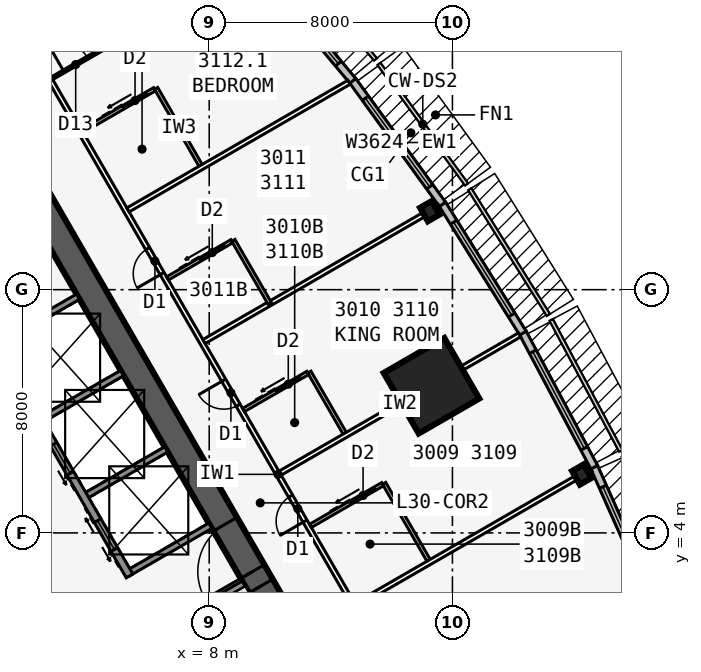
"""IFC4 building model, lengths in metres.
Left out: names, types, materials, properties, quantities, classifications, styles, units other than length and angle.
Written with IfcOpenShell. Run it as: python <this file> out.ifc"""

import sys

from ifc_helpers import new_model, si_unit, direction, frame, frame_2d, origin, origin_2d, place, context, subcontext, project, spatial, rectangle, i_section, extrude, element, fill, save


model = new_model("IFC4")
c1 = context("Model", 3, precision=1e-05, world=origin(), true_north=direction((0.0, 1.0)))
c2 = subcontext(c1, "Body", "Model", "MODEL_VIEW")
j1 = project(units=[si_unit("LENGTHUNIT", "METRE"), si_unit("PLANEANGLEUNIT", "RADIAN")], contexts=[c1])
p1 = place(None, origin())
s1 = spatial("IfcSite", under=j1, at=p1, CompositionType="ELEMENT")
p2 = place(p1, origin())
s2 = spatial("IfcBuilding", under=s1, at=p2, CompositionType="ELEMENT")
p3 = place(p2, frame((0.0, 0.0, 118.1)))
s3 = spatial("IfcBuildingStorey", under=s2, at=p3, CompositionType="ELEMENT", Elevation=118.1)
p4 = place(p3, frame((16.5, -9.526, 0.0), z_axis=(0.0, 0.0, 1.0), x_axis=(-0.499999749417, 0.866025548458, 0.0)))
e1 = element("IfcWall", 1, at=p4, inside=s3, PredefinedType="SHEAR", context=c2, shape_type="SweptSolid", body=[
    extrude(rectangle(XDim=33.0, YDim=0.9, at=frame_2d((16.5, 0.0))), origin(), (0.0, 0.0, 1.0), 3.4),
])
p5 = place(p4, frame((14.15, 0.0, 0.0)))
e2 = element("IfcOpeningElement", 2, at=p5, cuts=e1, PredefinedType="OPENING", context=c2, shape_type="SweptSolid", body=[
    extrude(rectangle(XDim=1.8, YDim=2.13, at=frame_2d((0.9, 1.065))), frame((0.0, 0.46, 0.0), z_axis=(0.0, -1.0, 0.0), x_axis=(1.0, 0.0, 0.0)), (0.0, 0.0, 1.0), 0.92),
])
p6 = place(p4, frame((12.6, 0.0, 0.0)))
e3 = element("IfcOpeningElement", 3, at=p6, cuts=e1, PredefinedType="OPENING", context=c2, shape_type="SweptSolid", body=[
    extrude(rectangle(XDim=1.0, YDim=2.13, at=frame_2d((0.5, 1.065))), frame((0.0, 0.46, 0.0), z_axis=(0.0, -1.0, 0.0), x_axis=(1.0, 0.0, 0.0)), (0.0, 0.0, 1.0), 0.92),
])
p7 = place(p3, frame((5.379, 2.586, 0.0), z_axis=(0.0, 0.0, 1.0), x_axis=(-0.500001375892, 0.866024609411, 0.0)))
e4 = element("IfcWall", 4, at=p7, inside=s3, PredefinedType="SOLIDWALL", context=c2, shape_type="SweptSolid", body=[
    extrude(rectangle(XDim=10.633, YDim=0.25, at=frame_2d((5.316, 0.0))), origin(), (0.0, 0.0, 1.0), 3.235),
])
p8 = place(p7, frame((9.164, 0.0, 0.0)))
e5 = element("IfcOpeningElement", 5, at=p8, cuts=e4, PredefinedType="OPENING", context=c2, shape_type="SweptSolid", body=[
    extrude(rectangle(XDim=0.9, YDim=2.13, at=frame_2d((0.45, 1.065))), frame((0.0, 0.135, 0.0), z_axis=(0.0, -1.0, 0.0), x_axis=(1.0, 0.0, 0.0)), (0.0, 0.0, 1.0), 0.27),
])
p9 = place(p7, frame((1.0, 0.0, 0.0)))
e6 = element("IfcOpeningElement", 6, at=p9, cuts=e4, PredefinedType="OPENING", context=c2, shape_type="SweptSolid", body=[
    extrude(rectangle(XDim=1.1, YDim=2.13, at=frame_2d((0.55, 1.065))), frame((0.0, 0.135, 0.0), z_axis=(0.0, -1.0, 0.0), x_axis=(1.0, 0.0, 0.0)), (0.0, 0.0, 1.0), 0.27),
])
p10 = place(p7, frame((3.9, 0.0, 0.0)))
e7 = element("IfcOpeningElement", 7, at=p10, cuts=e4, PredefinedType="OPENING", context=c2, shape_type="SweptSolid", body=[
    extrude(rectangle(XDim=1.1, YDim=2.13, at=frame_2d((0.55, 1.065))), frame((0.0, 0.135, 0.0), z_axis=(0.0, -1.0, 0.0), x_axis=(1.0, 0.0, 0.0)), (0.0, 0.0, 1.0), 0.27),
])
p11 = place(p7, frame((6.8, 0.0, 0.0)))
e8 = element("IfcOpeningElement", 8, at=p11, cuts=e4, PredefinedType="OPENING", context=c2, shape_type="SweptSolid", body=[
    extrude(rectangle(XDim=1.1, YDim=2.13, at=frame_2d((0.55, 1.065))), frame((0.0, 0.135, 0.0), z_axis=(0.0, -1.0, 0.0), x_axis=(1.0, 0.0, 0.0)), (0.0, 0.0, 1.0), 0.27),
])
for number, where, z_axis, x_axis in (
    (9, (6.429, 0.767, 0.0), (0.0, 0.0, 1.0), (0.866, 0.5, 0.0)),
    (10, (5.329, 2.673, 0.0), (0.0, 0.0, 1.0), (0.866, 0.5, 0.0)),
    (11, (3.879, 5.184, 0.0), (0.0, 0.0, 1.0), (0.866, 0.5, 0.0)),
    (12, (2.429, 7.696, 0.0), (0.0, 0.0, 1.0), (0.866, 0.5, 0.0)),
    (13, (0.979, 10.207, 0.0), (0.0, 0.0, 1.0), (0.866, 0.5, 0.0)),
):
    element("IfcWall", number, at=place(p3, frame(where, z_axis=z_axis, x_axis=x_axis)), inside=s3, PredefinedType="SOLIDWALL", context=c2, shape_type="SweptSolid", body=[
        extrude(rectangle(XDim=3.125, YDim=0.2, at=frame_2d((1.562, 0.0))), origin(), (0.0, 0.0, 1.0), 3.235),
    ])
for number, where, z_axis, x_axis in (
    (14, (20.254, 5.92, 0.0), (0.0, 0.0, 1.0), (0.866, 0.5, 0.0)),
    (15, (15.254, 14.58, 0.0), (0.0, 0.0, 1.0), (0.866, 0.5, 0.0)),
):
    element("IfcColumn", number, at=place(p3, frame(where, z_axis=z_axis, x_axis=x_axis)), inside=s3, PredefinedType="COLUMN", context=c2, shape_type="SweptSolid", body=[
        extrude(i_section(OverallWidth=0.437, OverallDepth=0.513, WebThickness=0.061, FlangeThickness=0.097, at=origin_2d()), origin(), (0.0, 0.0, 1.0), 3.4),
    ])
p12 = place(p3, frame((15.312, 8.84, 0.0), z_axis=(0.0, 0.0, 1.0), x_axis=(0.866025403784, 0.5, 0.0)))
e16 = element("IfcColumn", 16, at=p12, inside=s3, PredefinedType="COLUMN", context=c2, shape_type="SweptSolid", body=[
    extrude(rectangle(XDim=2.3, YDim=2.3, at=origin_2d()), origin(), (0.0, 0.0, 1.0), 3.4),
])
p13 = place(p3, frame((22.705, 1.576, 0.0), z_axis=(0.0, 0.0, 1.0), x_axis=(-0.406832200364, 0.913502906808, 0.0)))
e17 = element("IfcWall", 17, at=p13, inside=s3, PredefinedType="STANDARD", context=c2, shape_type="SweptSolid", body=[
    extrude(rectangle(XDim=5.028, YDim=0.25, at=frame_2d((2.514, 0.0))), origin(), (0.0, 0.0, 1.0), 3.235),
])
p14 = place(p13, frame((0.714, 0.0, 0.45)))
e18 = element("IfcOpeningElement", 18, at=p14, cuts=e17, PredefinedType="OPENING", context=c2, shape_type="SweptSolid", body=[
    extrude(rectangle(XDim=3.6, YDim=2.4, at=frame_2d((1.8, 1.2))), frame((0.0, 0.135, 0.0), z_axis=(0.0, -1.0, 0.0), x_axis=(1.0, 0.0, 0.0)), (0.0, 0.0, 1.0), 0.27),
])
p15 = place(p3, frame((20.663, 6.161, 0.0), z_axis=(0.0, 0.0, 1.0), x_axis=(-0.469404966864, 0.882982999317, 0.0)))
e19 = element("IfcWall", 19, at=p15, inside=s3, PredefinedType="STANDARD", context=c2, shape_type="SweptSolid", body=[
    extrude(rectangle(XDim=5.003, YDim=0.25, at=frame_2d((2.501, 0.0))), origin(), (0.0, 0.0, 1.0), 3.235),
])
p16 = place(p15, frame((0.701, 0.0, 0.45)))
e20 = element("IfcOpeningElement", 20, at=p16, cuts=e19, PredefinedType="OPENING", context=c2, shape_type="SweptSolid", body=[
    extrude(rectangle(XDim=3.6, YDim=2.4, at=frame_2d((1.8, 1.2))), frame((0.0, 0.135, 0.0), z_axis=(0.0, -1.0, 0.0), x_axis=(1.0, 0.0, 0.0)), (0.0, 0.0, 1.0), 0.27),
])
p17 = place(p3, frame((18.319, 10.571, 0.0), z_axis=(0.0, 0.0, 1.0), x_axis=(-0.529990167382, 0.84800378683, 0.0)))
e21 = element("IfcWall", 21, at=p17, inside=s3, PredefinedType="STANDARD", context=c2, shape_type="SweptSolid", body=[
    extrude(rectangle(XDim=5.003, YDim=0.25, at=frame_2d((2.501, 0.0))), origin(), (0.0, 0.0, 1.0), 3.235),
])
p18 = place(p17, frame((0.701, 0.0, 0.45)))
e22 = element("IfcOpeningElement", 22, at=p18, cuts=e21, PredefinedType="OPENING", context=c2, shape_type="SweptSolid", body=[
    extrude(rectangle(XDim=3.6, YDim=2.4, at=frame_2d((1.8, 1.2))), frame((0.0, 0.135, 0.0), z_axis=(0.0, -1.0, 0.0), x_axis=(1.0, 0.0, 0.0)), (0.0, 0.0, 1.0), 0.27),
])
p19 = place(p3, frame((15.672, 14.807, 0.0), z_axis=(0.0, 0.0, 1.0), x_axis=(-0.587669188412, 0.809101307001, 0.0)))
e23 = element("IfcWall", 23, at=p19, inside=s3, PredefinedType="STANDARD", context=c2, shape_type="SweptSolid", body=[
    extrude(rectangle(XDim=5.028, YDim=0.25, at=frame_2d((2.514, 0.0))), origin(), (0.0, 0.0, 1.0), 3.235),
])
p20 = place(p19, frame((0.714, 0.0, 0.45)))
e24 = element("IfcOpeningElement", 24, at=p20, cuts=e23, PredefinedType="OPENING", context=c2, shape_type="SweptSolid", body=[
    extrude(rectangle(XDim=3.6, YDim=2.4, at=frame_2d((1.8, 1.2))), frame((0.0, 0.135, 0.0), z_axis=(0.0, -1.0, 0.0), x_axis=(1.0, 0.0, 0.0)), (0.0, 0.0, 1.0), 0.27),
])
p21 = place(p3, frame((12.723, 18.868, 0.0), z_axis=(0.0, 0.0, 1.0), x_axis=(-0.641810386606, 0.766863369607, 0.0)))
e25 = element("IfcWall", 25, at=p21, inside=s3, PredefinedType="STANDARD", context=c2, shape_type="SweptSolid", body=[
    extrude(rectangle(XDim=5.076, YDim=0.25, at=frame_2d((2.538, 0.0))), origin(), (0.0, 0.0, 1.0), 3.235),
])
p22 = place(p21, frame((0.738, 0.0, 0.45)))
e26 = element("IfcOpeningElement", 26, at=p22, cuts=e25, PredefinedType="OPENING", context=c2, shape_type="SweptSolid", body=[
    extrude(rectangle(XDim=3.6, YDim=2.4, at=frame_2d((1.8, 1.2))), frame((0.0, 0.135, 0.0), z_axis=(0.0, -1.0, 0.0), x_axis=(1.0, 0.0, 0.0)), (0.0, 0.0, 1.0), 0.27),
])
p23 = place(p3, frame((20.027, -10.985, 0.0), z_axis=(0.0, 0.0, 1.0), x_axis=(-0.500001677587, 0.866024435227, 0.0)))
e27 = element("IfcWall", 27, at=p23, inside=s3, PredefinedType="PARTITIONING", context=c2, shape_type="SweptSolid", body=[
    extrude(rectangle(XDim=39.054, YDim=0.15, at=frame_2d((19.527, 0.0))), origin(), (0.0, 0.0, 1.0), 3.235),
])
p24 = place(p23, frame((0.352, 0.0, 0.0)))
e28 = element("IfcOpeningElement", 28, at=p24, cuts=e27, PredefinedType="OPENING", context=c2, shape_type="SweptSolid", body=[
    extrude(rectangle(XDim=0.95, YDim=2.13, at=frame_2d((0.475, 1.065))), frame((0.0, 0.085, 0.0), z_axis=(0.0, -1.0, 0.0), x_axis=(1.0, 0.0, 0.0)), (0.0, 0.0, 1.0), 0.17),
])
p25 = place(p23, frame((7.752, 0.0, 0.0)))
e29 = element("IfcOpeningElement", 29, at=p25, cuts=e27, PredefinedType="OPENING", context=c2, shape_type="SweptSolid", body=[
    extrude(rectangle(XDim=0.95, YDim=2.13, at=frame_2d((0.475, 1.065))), frame((0.0, 0.085, 0.0), z_axis=(0.0, -1.0, 0.0), x_axis=(1.0, 0.0, 0.0)), (0.0, 0.0, 1.0), 0.17),
])
p26 = place(p23, frame((17.752, 0.0, 0.0)))
e30 = element("IfcOpeningElement", 30, at=p26, cuts=e27, PredefinedType="OPENING", context=c2, shape_type="SweptSolid", body=[
    extrude(rectangle(XDim=0.95, YDim=2.13, at=frame_2d((0.475, 1.065))), frame((0.0, 0.085, 0.0), z_axis=(0.0, -1.0, 0.0), x_axis=(1.0, 0.0, 0.0)), (0.0, 0.0, 1.0), 0.17),
])
p27 = place(p23, frame((22.152, 0.0, 0.0)))
e31 = element("IfcOpeningElement", 31, at=p27, cuts=e27, PredefinedType="OPENING", context=c2, shape_type="SweptSolid", body=[
    extrude(rectangle(XDim=0.95, YDim=2.13, at=frame_2d((0.475, 1.065))), frame((0.0, 0.085, 0.0), z_axis=(0.0, -1.0, 0.0), x_axis=(1.0, 0.0, 0.0)), (0.0, 0.0, 1.0), 0.17),
])
p28 = place(p23, frame((27.152, 0.0, 0.0)))
e32 = element("IfcOpeningElement", 32, at=p28, cuts=e27, PredefinedType="OPENING", context=c2, shape_type="SweptSolid", body=[
    extrude(rectangle(XDim=0.95, YDim=2.13, at=frame_2d((0.475, 1.065))), frame((0.0, 0.085, 0.0), z_axis=(0.0, -1.0, 0.0), x_axis=(1.0, 0.0, 0.0)), (0.0, 0.0, 1.0), 0.17),
])
p29 = place(p23, frame((36.546, 0.0, 0.0)))
e33 = element("IfcOpeningElement", 33, at=p29, cuts=e27, PredefinedType="OPENING", context=c2, shape_type="SweptSolid", body=[
    extrude(rectangle(XDim=0.95, YDim=2.13, at=frame_2d((0.475, 1.065))), frame((0.0, 0.085, 0.0), z_axis=(0.0, -1.0, 0.0), x_axis=(1.0, 0.0, 0.0)), (0.0, 0.0, 1.0), 0.17),
])
p30 = place(p3, frame((12.829, 1.633, 0.0), z_axis=(0.0, 0.0, 1.0), x_axis=(0.866027015393, 0.499997208602, 0.0)))
e34 = element("IfcWall", 34, at=p30, inside=s3, PredefinedType="PARTITIONING", context=c2, shape_type="SweptSolid", body=[
    extrude(rectangle(XDim=8.922, YDim=0.15, at=frame_2d((4.461, 0.0))), origin(), (0.0, 0.0, 1.0), 2.389),
])
p31 = place(p3, frame((10.329, 5.963, 0.0), z_axis=(0.0, 0.0, 1.0), x_axis=(0.866025170687, 0.500000403736, 0.0)))
e35 = element("IfcWall", 35, at=p31, inside=s3, PredefinedType="PARTITIONING", context=c2, shape_type="SweptSolid", body=[
    extrude(rectangle(XDim=9.099, YDim=0.15, at=frame_2d((4.549, 0.0))), origin(), (0.0, 0.0, 1.0), 2.389),
])
p32 = place(p3, frame((7.829, 10.293, 0.0), z_axis=(0.0, 0.0, 1.0), x_axis=(0.866027015393, 0.499997208602, 0.0)))
e36 = element("IfcWall", 36, at=p32, inside=s3, PredefinedType="PARTITIONING", context=c2, shape_type="SweptSolid", body=[
    extrude(rectangle(XDim=8.922, YDim=0.15, at=frame_2d((4.461, 0.0))), origin(), (0.0, 0.0, 1.0), 2.389),
])
p33 = place(p3, frame((5.329, 14.623, 0.0), z_axis=(0.0, 0.0, 1.0), x_axis=(0.866011723728, 0.500023693804, 0.0)))
e37 = element("IfcWall", 37, at=p33, inside=s3, PredefinedType="PARTITIONING", context=c2, shape_type="SweptSolid", body=[
    extrude(rectangle(XDim=8.395, YDim=0.15, at=frame_2d((4.198, 0.0))), origin(), (0.0, 0.0, 1.0), 2.389),
])
p34 = place(p3, frame((2.829, 18.954, 0.0), z_axis=(0.0, 0.0, 1.0), x_axis=(0.866015739374, 0.500016738876, 0.0)))
e38 = element("IfcWall", 38, at=p34, inside=s3, PredefinedType="PARTITIONING", context=c2, shape_type="SweptSolid", body=[
    extrude(rectangle(XDim=7.516, YDim=0.1, at=frame_2d((3.758, 0.0))), origin(), (0.0, 0.0, 1.0), 2.389),
])
p35 = place(p34, frame((0.45, 0.0, 0.0)))
e39 = element("IfcOpeningElement", 39, at=p35, cuts=e38, PredefinedType="OPENING", context=c2, shape_type="SweptSolid", body=[
    extrude(rectangle(XDim=0.9, YDim=2.13, at=frame_2d((0.45, 1.065))), frame((0.0, 0.06, 0.0), z_axis=(0.0, -1.0, 0.0), x_axis=(1.0, 0.0, 0.0)), (0.0, 0.0, 1.0), 0.12),
])
p36 = place(p3, frame((15.253, 3.033, 0.0), z_axis=(0.0, 0.0, 1.0), x_axis=(-0.499990139034, 0.866031096941, 0.0)))
e40 = element("IfcWall", 40, at=p36, inside=s3, PredefinedType="PLUMBINGWALL", context=c2, shape_type="SweptSolid", body=[
    extrude(rectangle(XDim=3.0, YDim=0.12, at=frame_2d((1.5, 0.0))), origin(), (0.0, 0.0, 1.0), 3.235),
])
p37 = place(p3, frame((11.329, 4.231, 0.0), z_axis=(0.0, 0.0, 1.0), x_axis=(0.866035715982, 0.499982138324, 0.0)))
e41 = element("IfcWall", 41, at=p37, inside=s3, PredefinedType="PLUMBINGWALL", context=c2, shape_type="SweptSolid", body=[
    extrude(rectangle(XDim=2.74, YDim=0.12, at=frame_2d((1.37, 0.0))), origin(), (0.0, 0.0, 1.0), 3.235),
])
p38 = place(p37, frame((1.55, 0.0, 0.0)))
e42 = element("IfcOpeningElement", 42, at=p38, cuts=e41, PredefinedType="OPENING", context=c2, shape_type="SweptSolid", body=[
    extrude(rectangle(XDim=0.9, YDim=2.13, at=frame_2d((0.45, 1.065))), frame((0.0, 0.07, 0.0), z_axis=(0.0, -1.0, 0.0), x_axis=(1.0, 0.0, 0.0)), (0.0, 0.0, 1.0), 0.14),
])
p39 = place(p3, frame((12.493, 7.213, 0.0), z_axis=(0.0, 0.0, 1.0), x_axis=(-0.500001309137, 0.866024647952, 0.0)))
e43 = element("IfcWall", 43, at=p39, inside=s3, PredefinedType="PLUMBINGWALL", context=c2, shape_type="SweptSolid", body=[
    extrude(rectangle(XDim=2.4, YDim=0.12, at=frame_2d((1.2, 0.0))), origin(), (0.0, 0.0, 1.0), 3.235),
])
p40 = place(p3, frame((9.128, 8.042, 0.0), z_axis=(0.0, 0.0, 1.0), x_axis=(0.866005645448, 0.500034220881, 0.0)))
e44 = element("IfcWall", 44, at=p40, inside=s3, PredefinedType="PLUMBINGWALL", context=c2, shape_type="SweptSolid", body=[
    extrude(rectangle(XDim=2.44, YDim=0.12, at=frame_2d((1.22, 0.0))), origin(), (0.0, 0.0, 1.0), 3.235),
])
p41 = place(p40, frame((1.25, 0.0, 0.0)))
e45 = element("IfcOpeningElement", 45, at=p41, cuts=e44, PredefinedType="OPENING", context=c2, shape_type="SweptSolid", body=[
    extrude(rectangle(XDim=0.9, YDim=2.13, at=frame_2d((0.45, 1.065))), frame((0.0, 0.07, 0.0), z_axis=(0.0, -1.0, 0.0), x_axis=(1.0, 0.0, 0.0)), (0.0, 0.0, 1.0), 0.14),
])
p42 = place(p3, frame((9.993, 11.543, 0.0), z_axis=(0.0, 0.0, 1.0), x_axis=(-0.500001309137, 0.866024647952, 0.0)))
e46 = element("IfcWall", 46, at=p42, inside=s3, PredefinedType="PLUMBINGWALL", context=c2, shape_type="SweptSolid", body=[
    extrude(rectangle(XDim=2.4, YDim=0.12, at=frame_2d((1.2, 0.0))), origin(), (0.0, 0.0, 1.0), 3.235),
])
p43 = place(p3, frame((6.628, 12.372, 0.0), z_axis=(0.0, 0.0, 1.0), x_axis=(0.866005645448, 0.500034220881, 0.0)))
e47 = element("IfcWall", 47, at=p43, inside=s3, PredefinedType="PLUMBINGWALL", context=c2, shape_type="SweptSolid", body=[
    extrude(rectangle(XDim=2.44, YDim=0.12, at=frame_2d((1.22, 0.0))), origin(), (0.0, 0.0, 1.0), 3.235),
])
p44 = place(p43, frame((1.25, 0.0, 0.0)))
e48 = element("IfcOpeningElement", 48, at=p44, cuts=e47, PredefinedType="OPENING", context=c2, shape_type="SweptSolid", body=[
    extrude(rectangle(XDim=0.9, YDim=2.13, at=frame_2d((0.45, 1.065))), frame((0.0, 0.07, 0.0), z_axis=(0.0, -1.0, 0.0), x_axis=(1.0, 0.0, 0.0)), (0.0, 0.0, 1.0), 0.14),
])
p45 = place(p3, frame((7.753, 16.023, 0.0), z_axis=(0.0, 0.0, 1.0), x_axis=(-0.499990139034, 0.866031096941, 0.0)))
e49 = element("IfcWall", 49, at=p45, inside=s3, PredefinedType="PLUMBINGWALL", context=c2, shape_type="SweptSolid", body=[
    extrude(rectangle(XDim=3.0, YDim=0.12, at=frame_2d((1.5, 0.0))), origin(), (0.0, 0.0, 1.0), 3.235),
])
p46 = place(p3, frame((3.829, 17.221, 0.0), z_axis=(0.0, 0.0, 1.0), x_axis=(0.865997131366, 0.500048966069, 0.0)))
e50 = element("IfcWall", 50, at=p46, inside=s3, PredefinedType="PLUMBINGWALL", context=c2, shape_type="SweptSolid", body=[
    extrude(rectangle(XDim=2.74, YDim=0.12, at=frame_2d((1.37, 0.0))), origin(), (0.0, 0.0, 1.0), 3.235),
])
p47 = place(p46, frame((1.55, 0.0, 0.0)))
e51 = element("IfcOpeningElement", 51, at=p47, cuts=e50, PredefinedType="OPENING", context=c2, shape_type="SweptSolid", body=[
    extrude(rectangle(XDim=0.9, YDim=2.13, at=frame_2d((0.45, 1.065))), frame((0.0, 0.07, 0.0), z_axis=(0.0, -1.0, 0.0), x_axis=(1.0, 0.0, 0.0)), (0.0, 0.0, 1.0), 0.14),
])
p48 = place(p14, origin())
e52 = element("IfcWindow", 52, at=p48, inside=s3, PartitioningType="SINGLE_PANEL", PredefinedType="WINDOW", context=c2, shape_type="SweptSolid", body=[
    extrude(rectangle(XDim=3.6, YDim=2.4, at=frame_2d((1.8, 1.2))), frame((0.0, 0.03, 0.0), z_axis=(0.0, -1.0, 0.0), x_axis=(1.0, 0.0, 0.0)), (0.0, 0.0, 1.0), 0.06),
])
fill(e18, e52)
p49 = place(p16, origin())
e53 = element("IfcWindow", 53, at=p49, inside=s3, PartitioningType="SINGLE_PANEL", PredefinedType="WINDOW", context=c2, shape_type="SweptSolid", body=[
    extrude(rectangle(XDim=3.6, YDim=2.4, at=frame_2d((1.8, 1.2))), frame((0.0, 0.03, 0.0), z_axis=(0.0, -1.0, 0.0), x_axis=(1.0, 0.0, 0.0)), (0.0, 0.0, 1.0), 0.06),
])
fill(e20, e53)
p50 = place(p18, origin())
e54 = element("IfcWindow", 54, at=p50, inside=s3, PartitioningType="SINGLE_PANEL", PredefinedType="WINDOW", context=c2, shape_type="SweptSolid", body=[
    extrude(rectangle(XDim=3.6, YDim=2.4, at=frame_2d((1.8, 1.2))), frame((0.0, 0.03, 0.0), z_axis=(0.0, -1.0, 0.0), x_axis=(1.0, 0.0, 0.0)), (0.0, 0.0, 1.0), 0.06),
])
fill(e22, e54)
p51 = place(p20, origin())
e55 = element("IfcWindow", 55, at=p51, inside=s3, PartitioningType="SINGLE_PANEL", PredefinedType="WINDOW", context=c2, shape_type="SweptSolid", body=[
    extrude(rectangle(XDim=3.6, YDim=2.4, at=frame_2d((1.8, 1.2))), frame((0.0, 0.03, 0.0), z_axis=(0.0, -1.0, 0.0), x_axis=(1.0, 0.0, 0.0)), (0.0, 0.0, 1.0), 0.06),
])
fill(e24, e55)
p52 = place(p22, origin())
e56 = element("IfcWindow", 56, at=p52, inside=s3, PartitioningType="SINGLE_PANEL", PredefinedType="WINDOW", context=c2, shape_type="SweptSolid", body=[
    extrude(rectangle(XDim=3.6, YDim=2.4, at=frame_2d((1.8, 1.2))), frame((0.0, 0.03, 0.0), z_axis=(0.0, -1.0, 0.0), x_axis=(1.0, 0.0, 0.0)), (0.0, 0.0, 1.0), 0.06),
])
fill(e26, e56)
p53 = place(p35, origin())
e57 = element("IfcDoor", 57, at=p53, inside=s3, OperationType="SINGLE_SWING_LEFT", PredefinedType="DOOR", context=c2, shape_type="SweptSolid", body=[
    extrude(rectangle(XDim=0.9, YDim=2.13, at=frame_2d((0.45, 1.065))), frame((0.0, 0.025, 0.0), z_axis=(0.0, -1.0, 0.0), x_axis=(1.0, 0.0, 0.0)), (0.0, 0.0, 1.0), 0.05),
])
fill(e39, e57)
p54 = place(p38, origin())
e58 = element("IfcDoor", 58, at=p54, inside=s3, OperationType="SLIDING_TO_LEFT", PredefinedType="DOOR", context=c2, shape_type="SweptSolid", body=[
    extrude(rectangle(XDim=0.9, YDim=2.13, at=frame_2d((0.45, 1.065))), frame((0.0, 0.025, 0.0), z_axis=(0.0, -1.0, 0.0), x_axis=(1.0, 0.0, 0.0)), (0.0, 0.0, 1.0), 0.05),
])
fill(e42, e58)
p55 = place(p26, origin())
e59 = element("IfcDoor", 59, at=p55, inside=s3, OperationType="SINGLE_SWING_LEFT", PredefinedType="DOOR", context=c2, shape_type="SweptSolid", body=[
    extrude(rectangle(XDim=0.95, YDim=2.13, at=frame_2d((0.475, 1.065))), frame((0.0, 0.025, 0.0), z_axis=(0.0, -1.0, 0.0), x_axis=(1.0, 0.0, 0.0)), (0.0, 0.0, 1.0), 0.05),
])
fill(e30, e59)
p56 = place(p41, origin())
e60 = element("IfcDoor", 60, at=p56, inside=s3, OperationType="SLIDING_TO_LEFT", PredefinedType="DOOR", context=c2, shape_type="SweptSolid", body=[
    extrude(rectangle(XDim=0.9, YDim=2.13, at=frame_2d((0.45, 1.065))), frame((0.0, 0.025, 0.0), z_axis=(0.0, -1.0, 0.0), x_axis=(1.0, 0.0, 0.0)), (0.0, 0.0, 1.0), 0.05),
])
fill(e45, e60)
p57 = place(p27, origin())
e61 = element("IfcDoor", 61, at=p57, inside=s3, OperationType="SINGLE_SWING_RIGHT", PredefinedType="DOOR", context=c2, shape_type="SweptSolid", body=[
    extrude(rectangle(XDim=0.95, YDim=2.13, at=frame_2d((0.475, 1.065))), frame((0.0, 0.025, 0.0), z_axis=(0.0, -1.0, 0.0), x_axis=(1.0, 0.0, 0.0)), (0.0, 0.0, 1.0), 0.05),
])
fill(e31, e61)
p58 = place(p44, origin())
e62 = element("IfcDoor", 62, at=p58, inside=s3, OperationType="SLIDING_TO_LEFT", PredefinedType="DOOR", context=c2, shape_type="SweptSolid", body=[
    extrude(rectangle(XDim=0.9, YDim=2.13, at=frame_2d((0.45, 1.065))), frame((0.0, 0.025, 0.0), z_axis=(0.0, -1.0, 0.0), x_axis=(1.0, 0.0, 0.0)), (0.0, 0.0, 1.0), 0.05),
])
fill(e48, e62)
p59 = place(p28, origin())
e63 = element("IfcDoor", 63, at=p59, inside=s3, OperationType="SINGLE_SWING_LEFT", PredefinedType="DOOR", context=c2, shape_type="SweptSolid", body=[
    extrude(rectangle(XDim=0.95, YDim=2.13, at=frame_2d((0.475, 1.065))), frame((0.0, 0.025, 0.0), z_axis=(0.0, -1.0, 0.0), x_axis=(1.0, 0.0, 0.0)), (0.0, 0.0, 1.0), 0.05),
])
fill(e32, e63)
p60 = place(p47, origin())
e64 = element("IfcDoor", 64, at=p60, inside=s3, OperationType="SLIDING_TO_LEFT", PredefinedType="DOOR", context=c2, shape_type="SweptSolid", body=[
    extrude(rectangle(XDim=0.9, YDim=2.13, at=frame_2d((0.45, 1.065))), frame((0.0, 0.025, 0.0), z_axis=(0.0, -1.0, 0.0), x_axis=(1.0, 0.0, 0.0)), (0.0, 0.0, 1.0), 0.05),
])
fill(e51, e64)
p61 = place(p5, origin())
e65 = element("IfcDoor", 65, at=p61, inside=s3, OperationType="DOUBLE_DOOR_SINGLE_SWING", PredefinedType="DOOR", context=c2, shape_type="SweptSolid", body=[
    extrude(rectangle(XDim=1.8, YDim=2.13, at=frame_2d((0.9, 1.065))), frame((0.0, 0.025, 0.0), z_axis=(0.0, -1.0, 0.0), x_axis=(1.0, 0.0, 0.0)), (0.0, 0.0, 1.0), 0.05),
])
fill(e2, e65)
p62 = place(p6, origin())
e66 = element("IfcDoor", 66, at=p62, inside=s3, OperationType="SINGLE_SWING_RIGHT", PredefinedType="DOOR", context=c2, shape_type="SweptSolid", body=[
    extrude(rectangle(XDim=1.0, YDim=2.13, at=frame_2d((0.5, 1.065))), frame((0.0, 0.025, 0.0), z_axis=(0.0, -1.0, 0.0), x_axis=(1.0, 0.0, 0.0)), (0.0, 0.0, 1.0), 0.05),
])
fill(e3, e66)
p63 = place(p9, origin())
e67 = element("IfcDoor", 67, at=p63, inside=s3, OperationType="DOUBLE_DOOR_SLIDING", PredefinedType="USERDEFINED", context=c2, shape_type="SweptSolid", body=[
    extrude(rectangle(XDim=1.1, YDim=2.13, at=frame_2d((0.55, 1.065))), frame((0.0, 0.025, 0.0), z_axis=(0.0, -1.0, 0.0), x_axis=(1.0, 0.0, 0.0)), (0.0, 0.0, 1.0), 0.05),
])
fill(e6, e67)
p64 = place(p10, origin())
e68 = element("IfcDoor", 68, at=p64, inside=s3, OperationType="DOUBLE_DOOR_SLIDING", PredefinedType="USERDEFINED", context=c2, shape_type="SweptSolid", body=[
    extrude(rectangle(XDim=1.1, YDim=2.13, at=frame_2d((0.55, 1.065))), frame((0.0, 0.025, 0.0), z_axis=(0.0, -1.0, 0.0), x_axis=(1.0, 0.0, 0.0)), (0.0, 0.0, 1.0), 0.05),
])
fill(e7, e68)
save(model, sys.argv[1])
